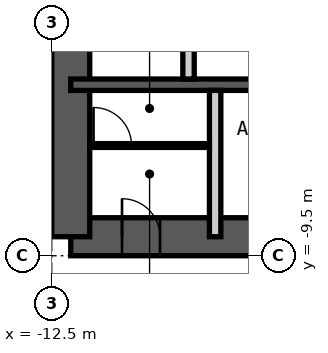
"""IFC4 building model, lengths in metres.
Left out: names, types, materials, properties, quantities, classifications, styles, units other than length and angle.
Written with IfcOpenShell. Run it as: python <this file> out.ifc"""

import sys

from ifc_helpers import new_model, si_unit, direction, frame, frame_2d, origin, place, context, subcontext, project, spatial, rectangle, extrude, element, fill, save


model = new_model("IFC4")
c1 = context("Model", 3, precision=1e-05, world=origin(), true_north=direction((0.0, 1.0)))
c2 = subcontext(c1, "Body", "Model", "MODEL_VIEW")
j1 = project(units=[si_unit("LENGTHUNIT", "METRE"), si_unit("PLANEANGLEUNIT", "RADIAN")], contexts=[c1])
p1 = place(None, origin())
s1 = spatial("IfcSite", under=j1, at=p1, CompositionType="ELEMENT")
p2 = place(p1, origin())
s2 = spatial("IfcBuilding", under=s1, at=p2, CompositionType="ELEMENT")
p3 = place(p2, frame((0.0, 0.0, 262.0)))
s3 = spatial("IfcBuildingStorey", under=s2, at=p3, CompositionType="ELEMENT", Elevation=262.0)
p4 = place(p3, frame((-12.0, -9.0, 0.0), z_axis=(0.0, 0.0, 1.0), x_axis=(1.0, 0.0, 0.0)))
e1 = element("IfcWall", 1, at=p4, inside=s3, PredefinedType="SHEAR", context=c2, shape_type="SweptSolid", body=[
    extrude(rectangle(XDim=24.0, YDim=1.0, at=frame_2d((12.0, 0.0))), origin(), (0.0, 0.0, 1.0), 4.2),
])
p5 = place(p4, frame((1.35, 0.0, 0.0)))
e2 = element("IfcOpeningElement", 2, at=p5, cuts=e1, PredefinedType="OPENING", context=c2, shape_type="SweptSolid", body=[
    extrude(rectangle(XDim=1.0, YDim=2.1, at=frame_2d((0.5, 1.05))), frame((0.0, 0.51, 0.0), z_axis=(0.0, -1.0, 0.0), x_axis=(1.0, 0.0, 0.0)), (0.0, 0.0, 1.0), 1.02),
])
p6 = place(p4, frame((5.325, 0.0, 0.0)))
e3 = element("IfcOpeningElement", 3, at=p6, cuts=e1, PredefinedType="OPENING", context=c2, shape_type="SweptSolid", body=[
    extrude(rectangle(XDim=1.15, YDim=2.1, at=frame_2d((0.575, 1.05))), frame((0.0, 0.51, 0.0), z_axis=(0.0, -1.0, 0.0), x_axis=(1.0, 0.0, 0.0)), (0.0, 0.0, 1.0), 1.02),
])
p7 = place(p4, frame((12.6, 0.0, 0.0)))
e4 = element("IfcOpeningElement", 4, at=p7, cuts=e1, PredefinedType="OPENING", context=c2, shape_type="SweptSolid", body=[
    extrude(rectangle(XDim=1.0, YDim=2.1, at=frame_2d((0.5, 1.05))), frame((0.0, 0.51, 0.0), z_axis=(0.0, -1.0, 0.0), x_axis=(1.0, 0.0, 0.0)), (0.0, 0.0, 1.0), 1.02),
])
p8 = place(p3, frame((-12.0, -9.0, 0.0), z_axis=(0.0, 0.0, 1.0), x_axis=(0.0, 1.0, 0.0)))
e5 = element("IfcWall", 5, at=p8, inside=s3, PredefinedType="SHEAR", context=c2, shape_type="SweptSolid", body=[
    extrude(rectangle(XDim=18.0, YDim=1.0, at=frame_2d((9.0, 0.0))), origin(), (0.0, 0.0, 1.0), 4.2),
])
p9 = place(p8, frame((8.1, 0.0, 0.0)))
e6 = element("IfcOpeningElement", 6, at=p9, cuts=e5, PredefinedType="OPENING", context=c2, shape_type="SweptSolid", body=[
    extrude(rectangle(XDim=1.8, YDim=2.1, at=frame_2d((0.9, 1.05))), frame((0.0, 0.51, 0.0), z_axis=(0.0, -1.0, 0.0), x_axis=(1.0, 0.0, 0.0)), (0.0, 0.0, 1.0), 1.02),
])
p10 = place(p3, frame((-12.0, -5.0, 0.0), z_axis=(0.0, 0.0, 1.0), x_axis=(1.0, 0.0, 0.0)))
e7 = element("IfcWall", 7, at=p10, inside=s3, PredefinedType="SHEAR", context=c2, shape_type="SweptSolid", body=[
    extrude(rectangle(XDim=24.0, YDim=0.3, at=frame_2d((12.0, 0.0))), origin(), (0.0, 0.0, 1.0), 4.2),
])
p11 = place(p3, frame((-8.9, -4.85, 0.0), z_axis=(0.0, 0.0, 1.0), x_axis=(0.0, 1.0, 0.0)))
e8 = element("IfcWall", 8, at=p11, inside=s3, PredefinedType="PARTITIONING", context=c2, shape_type="SweptSolid", body=[
    extrude(rectangle(XDim=2.65, YDim=0.3, at=frame_2d((1.325, 0.0))), origin(), (0.0, 0.0, 1.0), 3.98),
])
p12 = place(p3, frame((-8.2, -9.0, 0.0), z_axis=(0.0, 0.0, 1.0), x_axis=(0.0, 1.0, 0.0)))
e9 = element("IfcWall", 9, at=p12, inside=s3, PredefinedType="PARTITIONING", context=c2, shape_type="SweptSolid", body=[
    extrude(rectangle(XDim=3.85, YDim=0.3, at=frame_2d((1.925, 0.0))), origin(), (0.0, 0.0, 1.0), 3.98),
])
p13 = place(p3, frame((-11.5, -6.6, 0.0), z_axis=(0.0, 0.0, 1.0), x_axis=(1.0, 0.0, 0.0)))
e10 = element("IfcWall", 10, at=p13, inside=s3, PredefinedType="PARTITIONING", context=c2, shape_type="SweptSolid", body=[
    extrude(rectangle(XDim=3.15, YDim=0.1, at=frame_2d((1.575, 0.0))), origin(), (0.0, 0.0, 1.0), 3.98),
])
p14 = place(p13, frame((0.1, 0.0, 0.0)))
e11 = element("IfcOpeningElement", 11, at=p14, cuts=e10, PredefinedType="OPENING", context=c2, shape_type="SweptSolid", body=[
    extrude(rectangle(XDim=1.0, YDim=2.4, at=frame_2d((0.5, 1.2))), frame((0.0, 0.06, 0.0), z_axis=(0.0, -1.0, 0.0), x_axis=(1.0, 0.0, 0.0)), (0.0, 0.0, 1.0), 0.12),
])
p15 = place(p5, origin())
e12 = element("IfcDoor", 12, at=p15, inside=s3, OperationType="SINGLE_SWING_RIGHT", PredefinedType="DOOR", context=c2, shape_type="SweptSolid", body=[
    extrude(rectangle(XDim=1.0, YDim=2.1, at=frame_2d((0.5, 1.05))), frame((0.0, 0.025, 0.0), z_axis=(0.0, -1.0, 0.0), x_axis=(1.0, 0.0, 0.0)), (0.0, 0.0, 1.0), 0.05),
])
fill(e2, e12)
p16 = place(p14, origin())
e13 = element("IfcDoor", 13, at=p16, inside=s3, OperationType="SINGLE_SWING_RIGHT", PredefinedType="DOOR", context=c2, shape_type="SweptSolid", body=[
    extrude(rectangle(XDim=1.0, YDim=2.4, at=frame_2d((0.5, 1.2))), frame((0.0, 0.025, 0.0), z_axis=(0.0, -1.0, 0.0), x_axis=(1.0, 0.0, 0.0)), (0.0, 0.0, 1.0), 0.05),
])
fill(e11, e13)
save(model, sys.argv[1])
